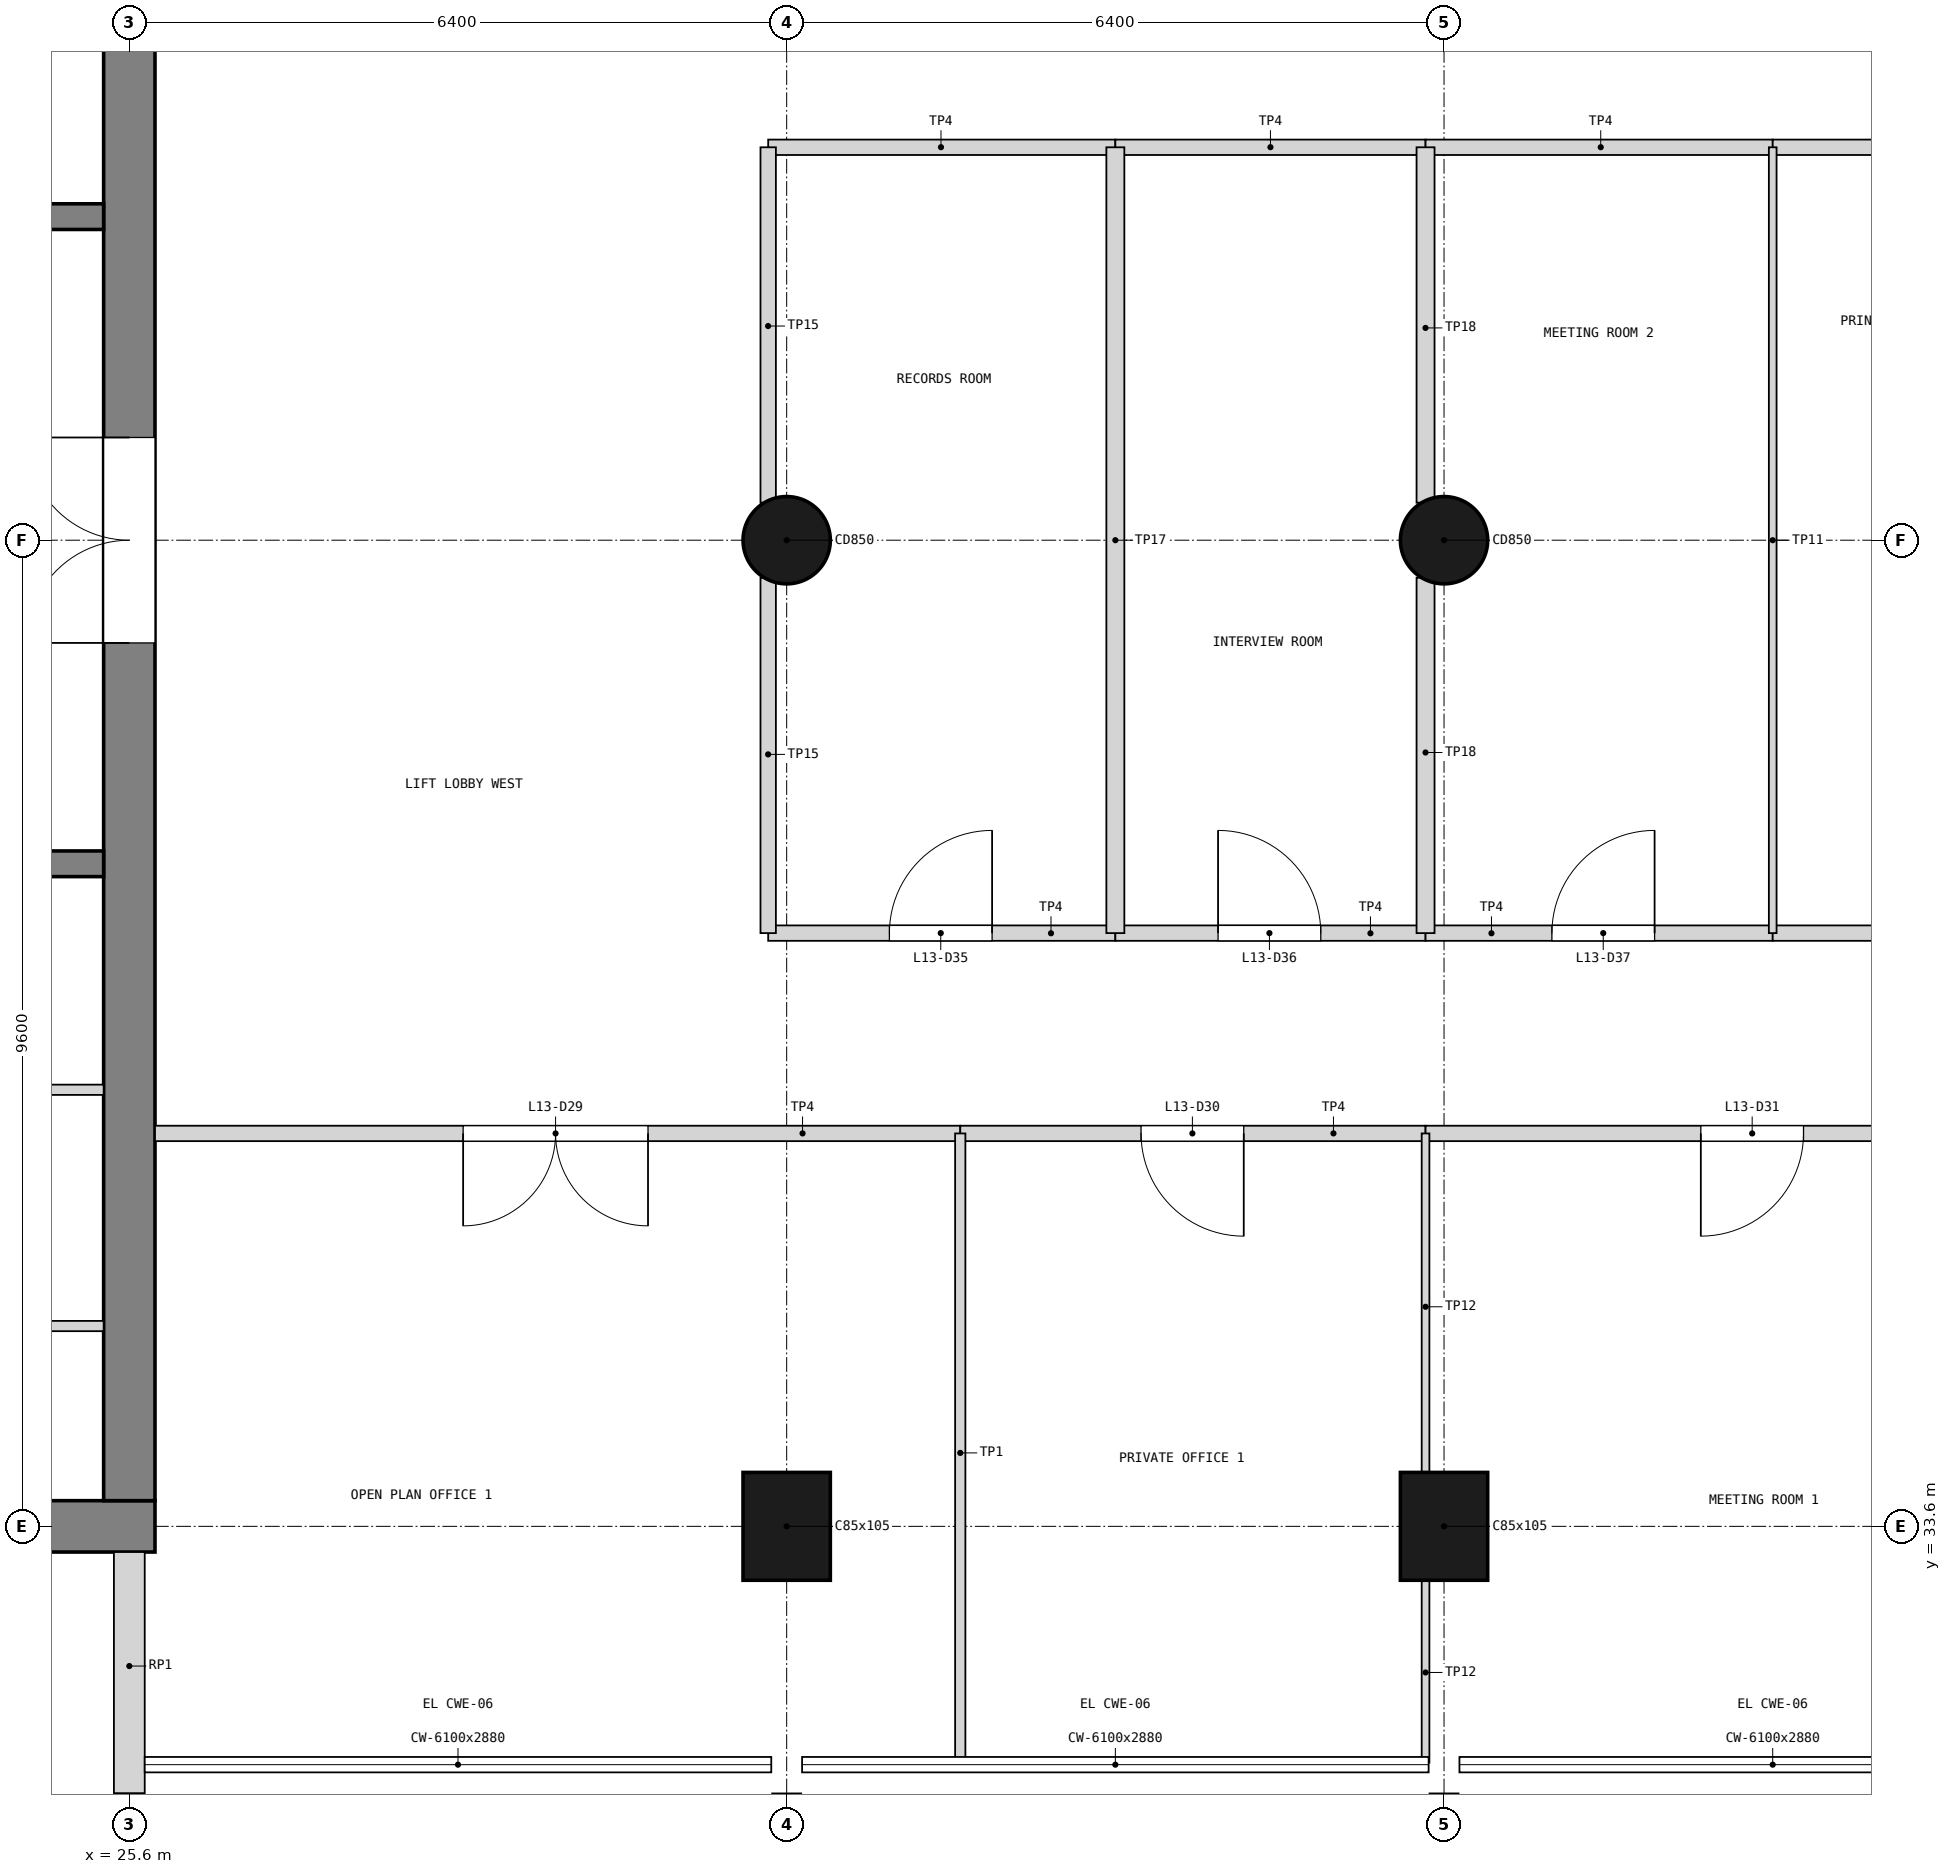
"""IFC4 building model, lengths in metres.
Left out: names, types, materials, properties, quantities, classifications, styles, units other than length and angle.
Written with IfcOpenShell. Run it as: python <this file> out.ifc"""

import sys

from ifc_helpers import new_model, si_unit, direction, frame, frame_2d, origin, origin_2d, place, context, subcontext, project, spatial, rectangle, circle, extrude, element, fill, save


model = new_model("IFC4")
c1 = context("Model", 3, precision=1e-05, world=origin(), true_north=direction((0.0, 1.0)))
c2 = subcontext(c1, "Body", "Model", "MODEL_VIEW")
j1 = project(units=[si_unit("LENGTHUNIT", "METRE"), si_unit("PLANEANGLEUNIT", "RADIAN")], contexts=[c1])
p1 = place(None, origin())
s1 = spatial("IfcSite", under=j1, at=p1, CompositionType="ELEMENT")
p2 = place(p1, origin())
s2 = spatial("IfcBuilding", under=s1, at=p2, CompositionType="ELEMENT")
p3 = place(p2, frame((0.0, 0.0, 52.2)))
s3 = spatial("IfcBuildingStorey", under=s2, at=p3, CompositionType="ELEMENT", Elevation=52.2)
p4 = place(p3, frame((12.55, 33.6, 0.0), z_axis=(0.0, 0.0, 1.0), x_axis=(1.0, 0.0, 0.0)))
e1 = element("IfcWall", 1, at=p4, inside=s3, PredefinedType="SHEAR", context=c2, shape_type="SweptSolid", body=[
    extrude(rectangle(XDim=13.3, YDim=0.5, at=frame_2d((6.65, 0.0))), origin(), (0.0, 0.0, 1.0), 3.9),
])
p5 = place(p4, frame((1.85, 0.0, 1.0)))
e2 = element("IfcOpeningElement", 2, at=p5, cuts=e1, PredefinedType="OPENING", context=c2, shape_type="SweptSolid", body=[
    extrude(rectangle(XDim=0.4, YDim=2.0, at=frame_2d((0.2, 1.0))), frame((0.0, 0.26, 0.0), z_axis=(0.0, -1.0, 0.0), x_axis=(1.0, 0.0, 0.0)), (0.0, 0.0, 1.0), 0.52),
])
p6 = place(p3, frame((25.6, 33.85, 0.0), z_axis=(0.0, 0.0, 1.0), x_axis=(0.0, 1.0, 0.0)))
e3 = element("IfcWall", 3, at=p6, inside=s3, PredefinedType="SHEAR", context=c2, shape_type="SweptSolid", body=[
    extrude(rectangle(XDim=18.7, YDim=0.5, at=frame_2d((9.35, 0.0))), origin(), (0.0, 0.0, 1.0), 3.9),
])
p7 = place(p6, frame((8.35, 0.0, 0.0)))
e4 = element("IfcOpeningElement", 4, at=p7, cuts=e3, PredefinedType="OPENING", context=c2, shape_type="SweptSolid", body=[
    extrude(rectangle(XDim=2.0, YDim=2.1, at=frame_2d((1.0, 1.05))), frame((0.0, 0.26, 0.0), z_axis=(0.0, -1.0, 0.0), x_axis=(1.0, 0.0, 0.0)), (0.0, 0.0, 1.0), 0.52),
])
p8 = place(p3, frame((32.0, 33.6, 0.0), z_axis=(0.0, 0.0, 1.0), x_axis=(1.0, 0.0, 0.0)))
e5 = element("IfcColumn", 5, at=p8, inside=s3, PredefinedType="COLUMN", context=c2, shape_type="SweptSolid", body=[
    extrude(rectangle(XDim=0.85, YDim=1.05, at=origin_2d()), origin(), (0.0, 0.0, 1.0), 3.9),
])
p9 = place(p3, frame((32.0, 43.2, 0.0), z_axis=(0.0, 0.0, 1.0), x_axis=(1.0, 0.0, 0.0)))
e6 = element("IfcColumn", 6, at=p9, inside=s3, PredefinedType="COLUMN", context=c2, shape_type="SweptSolid", body=[
    extrude(circle(Radius=0.425, at=origin_2d()), origin(), (0.0, 0.0, 1.0), 3.9),
])
p10 = place(p3, frame((38.4, 33.6, 0.0), z_axis=(0.0, 0.0, 1.0), x_axis=(1.0, 0.0, 0.0)))
e7 = element("IfcColumn", 7, at=p10, inside=s3, PredefinedType="COLUMN", context=c2, shape_type="SweptSolid", body=[
    extrude(rectangle(XDim=0.85, YDim=1.05, at=origin_2d()), origin(), (0.0, 0.0, 1.0), 3.9),
])
p11 = place(p3, frame((38.4, 43.2, 0.0), z_axis=(0.0, 0.0, 1.0), x_axis=(1.0, 0.0, 0.0)))
e8 = element("IfcColumn", 8, at=p11, inside=s3, PredefinedType="COLUMN", context=c2, shape_type="SweptSolid", body=[
    extrude(circle(Radius=0.425, at=origin_2d()), origin(), (0.0, 0.0, 1.0), 3.9),
])
p12 = place(p3, frame((25.6, 31.0, 0.0), z_axis=(0.0, 0.0, 1.0), x_axis=(0.0, 1.0, 0.0)))
e9 = element("IfcWall", 9, at=p12, inside=s3, PredefinedType="SOLIDWALL", context=c2, shape_type="SweptSolid", body=[
    extrude(rectangle(XDim=2.35, YDim=0.3, at=frame_2d((1.175, 0.0))), origin(), (0.0, 0.0, 1.0), 2.88),
])
for number, where, z_axis, x_axis in (
    (10, (19.875, 40.05, 0.0), (0.0, 0.0, 1.0), (1.0, 0.0, 0.0)),
    (11, (19.875, 46.35, 0.0), (0.0, 0.0, 1.0), (1.0, 0.0, 0.0)),
):
    element("IfcWall", number, at=place(p3, frame(where, z_axis=z_axis, x_axis=x_axis)), inside=s3, PredefinedType="SOLIDWALL", context=c2, shape_type="SweptSolid", body=[
        extrude(rectangle(XDim=5.475, YDim=0.25, at=frame_2d((2.738, 0.0))), origin(), (0.0, 0.0, 1.0), 3.6),
    ])
p13 = place(p3, frame((20.125, 35.55, 0.0), z_axis=(0.0, 0.0, 1.0), x_axis=(1.0, 0.0, 0.0)))
e12 = element("IfcWall", 12, at=p13, inside=s3, PredefinedType="PARTITIONING", context=c2, shape_type="SweptSolid", body=[
    extrude(rectangle(XDim=5.225, YDim=0.1, at=frame_2d((2.613, 0.0))), origin(), (0.0, 0.0, 1.0), 3.6),
])
p14 = place(p3, frame((21.675, 37.85, 0.0), z_axis=(0.0, 0.0, 1.0), x_axis=(1.0, 0.0, 0.0)))
e13 = element("IfcWall", 13, at=p14, inside=s3, PredefinedType="PARTITIONING", context=c2, shape_type="SweptSolid", body=[
    extrude(rectangle(XDim=3.675, YDim=0.1, at=frame_2d((1.837, 0.0))), origin(), (0.0, 0.0, 1.0), 3.6),
])
p15 = place(p3, frame((25.85, 37.425, 0.0), z_axis=(0.0, 0.0, 1.0), x_axis=(1.0, 0.0, 0.0)))
e14 = element("IfcWall", 14, at=p15, inside=s3, PredefinedType="PARTITIONING", context=c2, shape_type="SweptSolid", body=[
    extrude(rectangle(XDim=7.84, YDim=0.15, at=frame_2d((3.92, 0.0))), origin(), (0.0, 0.0, 1.0), 3.68),
])
p16 = place(p15, frame((3.0, 0.0, 0.0)))
e15 = element("IfcOpeningElement", 15, at=p16, cuts=e14, PredefinedType="OPENING", context=c2, shape_type="SweptSolid", body=[
    extrude(rectangle(XDim=1.8, YDim=2.1, at=frame_2d((0.9, 1.05))), frame((0.0, 0.085, 0.0), z_axis=(0.0, -1.0, 0.0), x_axis=(1.0, 0.0, 0.0)), (0.0, 0.0, 1.0), 0.17),
])
p17 = place(p3, frame((33.69, 37.425, 0.0), z_axis=(0.0, 0.0, 1.0), x_axis=(1.0, 0.0, 0.0)))
e16 = element("IfcWall", 16, at=p17, inside=s3, PredefinedType="PARTITIONING", context=c2, shape_type="SweptSolid", body=[
    extrude(rectangle(XDim=4.53, YDim=0.15, at=frame_2d((2.265, 0.0))), origin(), (0.0, 0.0, 1.0), 3.68),
])
p18 = place(p17, frame((1.76, 0.0, 0.0)))
e17 = element("IfcOpeningElement", 17, at=p18, cuts=e16, PredefinedType="OPENING", context=c2, shape_type="SweptSolid", body=[
    extrude(rectangle(XDim=1.0, YDim=2.1, at=frame_2d((0.5, 1.05))), frame((0.0, 0.085, 0.0), z_axis=(0.0, -1.0, 0.0), x_axis=(1.0, 0.0, 0.0)), (0.0, 0.0, 1.0), 0.17),
])
p19 = place(p3, frame((38.22, 37.425, 0.0), z_axis=(0.0, 0.0, 1.0), x_axis=(1.0, 0.0, 0.0)))
e18 = element("IfcWall", 18, at=p19, inside=s3, PredefinedType="PARTITIONING", context=c2, shape_type="SweptSolid", body=[
    extrude(rectangle(XDim=6.4, YDim=0.15, at=frame_2d((3.2, 0.0))), origin(), (0.0, 0.0, 1.0), 3.68),
])
p20 = place(p19, frame((2.68, 0.0, 0.0)))
e19 = element("IfcOpeningElement", 19, at=p20, cuts=e18, PredefinedType="OPENING", context=c2, shape_type="SweptSolid", body=[
    extrude(rectangle(XDim=1.0, YDim=2.1, at=frame_2d((0.5, 1.05))), frame((0.0, 0.085, 0.0), z_axis=(0.0, -1.0, 0.0), x_axis=(1.0, 0.0, 0.0)), (0.0, 0.0, 1.0), 0.17),
])
p21 = place(p3, frame((33.69, 31.3, 0.0), z_axis=(0.0, 0.0, 1.0), x_axis=(0.0, 1.0, 0.0)))
e20 = element("IfcWall", 20, at=p21, inside=s3, PredefinedType="PARTITIONING", context=c2, shape_type="SweptSolid", body=[
    extrude(rectangle(XDim=6.125, YDim=0.1, at=frame_2d((3.062, 0.0))), origin(), (0.0, 0.0, 1.0), 3.68),
])
p22 = place(p3, frame((38.22, 31.3, 0.0), z_axis=(0.0, 0.0, 1.0), x_axis=(0.0, 1.0, 0.0)))
e21 = element("IfcWall", 21, at=p22, inside=s3, PredefinedType="PARTITIONING", context=c2, shape_type="SweptSolid", body=[
    extrude(rectangle(XDim=1.795, YDim=0.075, at=frame_2d((0.897, 0.0))), origin(), (0.0, 0.0, 1.0), 2.78),
])
p23 = place(p3, frame((38.22, 34.105, 0.0), z_axis=(0.0, 0.0, 1.0), x_axis=(0.0, 1.0, 0.0)))
e22 = element("IfcWall", 22, at=p23, inside=s3, PredefinedType="PARTITIONING", context=c2, shape_type="SweptSolid", body=[
    extrude(rectangle(XDim=3.32, YDim=0.075, at=frame_2d((1.66, 0.0))), origin(), (0.0, 0.0, 1.0), 2.78),
])
p24 = place(p3, frame((31.82, 39.375, 0.0), z_axis=(0.0, 0.0, 1.0), x_axis=(1.0, 0.0, 0.0)))
e23 = element("IfcWall", 23, at=p24, inside=s3, PredefinedType="PARTITIONING", context=c2, shape_type="SweptSolid", body=[
    extrude(rectangle(XDim=3.38, YDim=0.15, at=frame_2d((1.69, 0.0))), origin(), (0.0, 0.0, 1.0), 3.68),
])
p25 = place(p24, frame((1.18, 0.0, 0.0)))
e24 = element("IfcOpeningElement", 24, at=p25, cuts=e23, PredefinedType="OPENING", context=c2, shape_type="SweptSolid", body=[
    extrude(rectangle(XDim=1.0, YDim=2.1, at=frame_2d((0.5, 1.05))), frame((0.0, 0.085, 0.0), z_axis=(0.0, -1.0, 0.0), x_axis=(1.0, 0.0, 0.0)), (0.0, 0.0, 1.0), 0.17),
])
p26 = place(p3, frame((31.82, 47.025, 0.0), z_axis=(0.0, 0.0, 1.0), x_axis=(1.0, 0.0, 0.0)))
e25 = element("IfcWall", 25, at=p26, inside=s3, PredefinedType="PARTITIONING", context=c2, shape_type="SweptSolid", body=[
    extrude(rectangle(XDim=3.38, YDim=0.15, at=frame_2d((1.69, 0.0))), origin(), (0.0, 0.0, 1.0), 3.68),
])
p27 = place(p3, frame((35.2, 39.375, 0.0), z_axis=(0.0, 0.0, 1.0), x_axis=(1.0, 0.0, 0.0)))
e26 = element("IfcWall", 26, at=p27, inside=s3, PredefinedType="PARTITIONING", context=c2, shape_type="SweptSolid", body=[
    extrude(rectangle(XDim=3.02, YDim=0.15, at=frame_2d((1.51, 0.0))), origin(), (0.0, 0.0, 1.0), 3.68),
])
p28 = place(p27, frame((1.0, 0.0, 0.0)))
e27 = element("IfcOpeningElement", 27, at=p28, cuts=e26, PredefinedType="OPENING", context=c2, shape_type="SweptSolid", body=[
    extrude(rectangle(XDim=1.0, YDim=2.1, at=frame_2d((0.5, 1.05))), frame((0.0, 0.085, 0.0), z_axis=(0.0, -1.0, 0.0), x_axis=(1.0, 0.0, 0.0)), (0.0, 0.0, 1.0), 0.17),
])
p29 = place(p3, frame((35.2, 47.025, 0.0), z_axis=(0.0, 0.0, 1.0), x_axis=(1.0, 0.0, 0.0)))
e28 = element("IfcWall", 28, at=p29, inside=s3, PredefinedType="PARTITIONING", context=c2, shape_type="SweptSolid", body=[
    extrude(rectangle(XDim=3.02, YDim=0.15, at=frame_2d((1.51, 0.0))), origin(), (0.0, 0.0, 1.0), 3.68),
])
p30 = place(p3, frame((38.22, 39.375, 0.0), z_axis=(0.0, 0.0, 1.0), x_axis=(1.0, 0.0, 0.0)))
e29 = element("IfcWall", 29, at=p30, inside=s3, PredefinedType="PARTITIONING", context=c2, shape_type="SweptSolid", body=[
    extrude(rectangle(XDim=3.38, YDim=0.15, at=frame_2d((1.69, 0.0))), origin(), (0.0, 0.0, 1.0), 3.68),
])
p31 = place(p30, frame((1.23, 0.0, 0.0)))
e30 = element("IfcOpeningElement", 30, at=p31, cuts=e29, PredefinedType="OPENING", context=c2, shape_type="SweptSolid", body=[
    extrude(rectangle(XDim=1.0, YDim=2.1, at=frame_2d((0.5, 1.05))), frame((0.0, 0.085, 0.0), z_axis=(0.0, -1.0, 0.0), x_axis=(1.0, 0.0, 0.0)), (0.0, 0.0, 1.0), 0.17),
])
p32 = place(p3, frame((38.22, 47.025, 0.0), z_axis=(0.0, 0.0, 1.0), x_axis=(1.0, 0.0, 0.0)))
e31 = element("IfcWall", 31, at=p32, inside=s3, PredefinedType="PARTITIONING", context=c2, shape_type="SweptSolid", body=[
    extrude(rectangle(XDim=3.38, YDim=0.15, at=frame_2d((1.69, 0.0))), origin(), (0.0, 0.0, 1.0), 3.68),
])
p33 = place(p3, frame((41.6, 39.375, 0.0), z_axis=(0.0, 0.0, 1.0), x_axis=(1.0, 0.0, 0.0)))
e32 = element("IfcWall", 32, at=p33, inside=s3, PredefinedType="PARTITIONING", context=c2, shape_type="SweptSolid", body=[
    extrude(rectangle(XDim=3.02, YDim=0.15, at=frame_2d((1.51, 0.0))), origin(), (0.0, 0.0, 1.0), 3.68),
])
p34 = place(p33, frame((1.0, 0.0, 0.0)))
e33 = element("IfcOpeningElement", 33, at=p34, cuts=e32, PredefinedType="OPENING", context=c2, shape_type="SweptSolid", body=[
    extrude(rectangle(XDim=1.0, YDim=2.1, at=frame_2d((0.5, 1.05))), frame((0.0, 0.085, 0.0), z_axis=(0.0, -1.0, 0.0), x_axis=(1.0, 0.0, 0.0)), (0.0, 0.0, 1.0), 0.17),
])
p35 = place(p3, frame((41.6, 47.025, 0.0), z_axis=(0.0, 0.0, 1.0), x_axis=(1.0, 0.0, 0.0)))
e34 = element("IfcWall", 34, at=p35, inside=s3, PredefinedType="PARTITIONING", context=c2, shape_type="SweptSolid", body=[
    extrude(rectangle(XDim=3.02, YDim=0.15, at=frame_2d((1.51, 0.0))), origin(), (0.0, 0.0, 1.0), 3.68),
])
p36 = place(p3, frame((35.2, 39.375, 0.0), z_axis=(0.0, 0.0, 1.0), x_axis=(0.0, 1.0, 0.0)))
e35 = element("IfcWall", 35, at=p36, inside=s3, PredefinedType="PARTITIONING", context=c2, shape_type="SweptSolid", body=[
    extrude(rectangle(XDim=7.65, YDim=0.175, at=frame_2d((3.825, 0.0))), origin(), (0.0, 0.0, 1.0), 3.08),
])
for number, where, z_axis, x_axis in (
    (36, (38.22, 39.375, 0.0), (0.0, 0.0, 1.0), (0.0, 1.0, 0.0)),
    (37, (38.22, 43.565, 0.0), (0.0, 0.0, 1.0), (0.0, 1.0, 0.0)),
):
    element("IfcWall", number, at=place(p3, frame(where, z_axis=z_axis, x_axis=x_axis)), inside=s3, PredefinedType="PARTITIONING", context=c2, shape_type="SweptSolid", body=[
        extrude(rectangle(XDim=3.46, YDim=0.175, at=frame_2d((1.73, 0.0))), origin(), (0.0, 0.0, 1.0), 2.78),
    ])
p37 = place(p3, frame((41.6, 39.375, 0.0), z_axis=(0.0, 0.0, 1.0), x_axis=(0.0, 1.0, 0.0)))
e38 = element("IfcWall", 38, at=p37, inside=s3, PredefinedType="PARTITIONING", context=c2, shape_type="SweptSolid", body=[
    extrude(rectangle(XDim=7.65, YDim=0.075, at=frame_2d((3.825, 0.0))), origin(), (0.0, 0.0, 1.0), 3.08),
])
for number, where, z_axis, x_axis in (
    (39, (31.82, 39.375, 0.0), (0.0, 0.0, 1.0), (0.0, 1.0, 0.0)),
    (40, (31.82, 43.565, 0.0), (0.0, 0.0, 1.0), (0.0, 1.0, 0.0)),
):
    element("IfcWall", number, at=place(p3, frame(where, z_axis=z_axis, x_axis=x_axis)), inside=s3, PredefinedType="PARTITIONING", context=c2, shape_type="SweptSolid", body=[
        extrude(rectangle(XDim=3.46, YDim=0.15, at=frame_2d((1.73, 0.0))), origin(), (0.0, 0.0, 1.0), 2.78),
    ])
p38 = place(p7, origin())
e41 = element("IfcDoor", 41, at=p38, inside=s3, OperationType="DOUBLE_DOOR_SINGLE_SWING", PredefinedType="DOOR", context=c2, shape_type="SweptSolid", body=[
    extrude(rectangle(XDim=2.0, YDim=2.1, at=frame_2d((1.0, 1.05))), frame((0.0, 0.025, 0.0), z_axis=(0.0, -1.0, 0.0), x_axis=(1.0, 0.0, 0.0)), (0.0, 0.0, 1.0), 0.05),
])
fill(e4, e41)
p39 = place(p16, frame((1.8, 0.0, 0.0), z_axis=(0.0, 0.0, 1.0), x_axis=(-1.0, 0.0, 0.0)))
e42 = element("IfcDoor", 42, at=p39, inside=s3, OperationType="DOUBLE_DOOR_SINGLE_SWING", PredefinedType="DOOR", context=c2, shape_type="SweptSolid", body=[
    extrude(rectangle(XDim=1.8, YDim=2.1, at=frame_2d((0.9, 1.05))), frame((0.0, 0.025, 0.0), z_axis=(0.0, -1.0, 0.0), x_axis=(1.0, 0.0, 0.0)), (0.0, 0.0, 1.0), 0.05),
])
fill(e15, e42)
p40 = place(p18, frame((1.0, 0.0, 0.0), z_axis=(0.0, 0.0, 1.0), x_axis=(-1.0, 0.0, 0.0)))
e43 = element("IfcDoor", 43, at=p40, inside=s3, OperationType="SINGLE_SWING_LEFT", PredefinedType="DOOR", context=c2, shape_type="SweptSolid", body=[
    extrude(rectangle(XDim=1.0, YDim=2.1, at=frame_2d((0.5, 1.05))), frame((0.0, 0.025, 0.0), z_axis=(0.0, -1.0, 0.0), x_axis=(1.0, 0.0, 0.0)), (0.0, 0.0, 1.0), 0.05),
])
fill(e17, e43)
p41 = place(p20, frame((1.0, 0.0, 0.0), z_axis=(0.0, 0.0, 1.0), x_axis=(-1.0, 0.0, 0.0)))
e44 = element("IfcDoor", 44, at=p41, inside=s3, OperationType="SINGLE_SWING_RIGHT", PredefinedType="DOOR", context=c2, shape_type="SweptSolid", body=[
    extrude(rectangle(XDim=1.0, YDim=2.1, at=frame_2d((0.5, 1.05))), frame((0.0, 0.025, 0.0), z_axis=(0.0, -1.0, 0.0), x_axis=(1.0, 0.0, 0.0)), (0.0, 0.0, 1.0), 0.05),
])
fill(e19, e44)
p42 = place(p25, origin())
e45 = element("IfcDoor", 45, at=p42, inside=s3, OperationType="SINGLE_SWING_RIGHT", PredefinedType="DOOR", context=c2, shape_type="SweptSolid", body=[
    extrude(rectangle(XDim=1.0, YDim=2.1, at=frame_2d((0.5, 1.05))), frame((0.0, 0.025, 0.0), z_axis=(0.0, -1.0, 0.0), x_axis=(1.0, 0.0, 0.0)), (0.0, 0.0, 1.0), 0.05),
])
fill(e24, e45)
p43 = place(p28, origin())
e46 = element("IfcDoor", 46, at=p43, inside=s3, OperationType="SINGLE_SWING_LEFT", PredefinedType="DOOR", context=c2, shape_type="SweptSolid", body=[
    extrude(rectangle(XDim=1.0, YDim=2.1, at=frame_2d((0.5, 1.05))), frame((0.0, 0.025, 0.0), z_axis=(0.0, -1.0, 0.0), x_axis=(1.0, 0.0, 0.0)), (0.0, 0.0, 1.0), 0.05),
])
fill(e27, e46)
p44 = place(p31, origin())
e47 = element("IfcDoor", 47, at=p44, inside=s3, OperationType="SINGLE_SWING_RIGHT", PredefinedType="DOOR", context=c2, shape_type="SweptSolid", body=[
    extrude(rectangle(XDim=1.0, YDim=2.1, at=frame_2d((0.5, 1.05))), frame((0.0, 0.025, 0.0), z_axis=(0.0, -1.0, 0.0), x_axis=(1.0, 0.0, 0.0)), (0.0, 0.0, 1.0), 0.05),
])
fill(e30, e47)
save(model, sys.argv[1])
